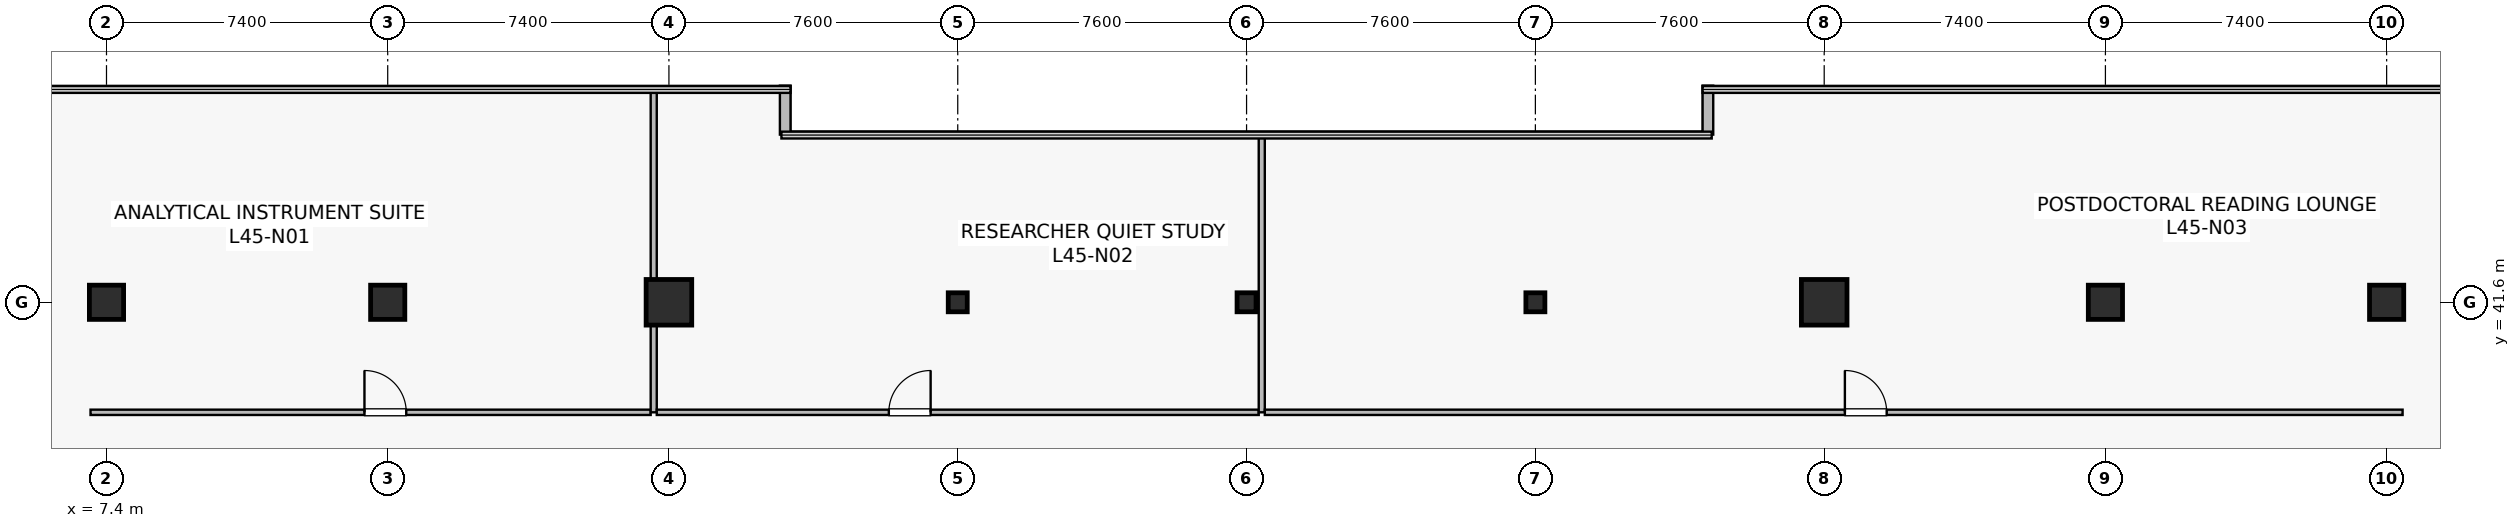
"""IFC4 building model, lengths in metres.
Left out: names, types, materials, properties, quantities, classifications, styles, units other than length and angle.
Written with IfcOpenShell. Run it as: python <this file> out.ifc"""

import sys

from ifc_helpers import new_model, si_unit, direction, frame, frame_2d, origin, origin_2d, place, context, subcontext, project, spatial, rectangle, hollow_rectangle, extrude, source, transform, mapped, element, fill, save


model = new_model("IFC4")
c1 = context("Model", 3, precision=1e-05, world=origin(), true_north=direction((0.0, 1.0)))
c2 = subcontext(c1, "Body", "Model", "MODEL_VIEW")
j1 = project(units=[si_unit("LENGTHUNIT", "METRE"), si_unit("PLANEANGLEUNIT", "RADIAN")], contexts=[c1])
p1 = place(None, origin())
s1 = spatial("IfcSite", under=j1, at=p1, CompositionType="ELEMENT")
p2 = place(p1, origin())
s2 = spatial("IfcBuilding", under=s1, at=p2, CompositionType="ELEMENT")
p3 = place(p2, frame((0.0, 0.0, 187.1)))
s3 = spatial("IfcBuildingStorey", under=s2, at=p3, CompositionType="ELEMENT", Elevation=187.1)
m1 = source(origin(), c2, "Body", "SweptSolid", [
    extrude(rectangle(XDim=0.9, YDim=0.9, at=origin_2d()), origin(), (0.0, 0.0, 1.0), 4.1),
])
p4 = place(p3, frame((14.8, 41.6, 0.0), z_axis=(0.0, 0.0, 1.0), x_axis=(1.0, 0.0, 0.0)))
e1 = element("IfcColumn", 1, at=p4, inside=s3, PredefinedType="COLUMN", context=c2, shape_type="MappedRepresentation", body=[
    mapped(m1, transform((0.0, 0.0, 0.0), scale=1.0)),
])
m2 = source(origin(), c2, "Body", "SweptSolid", [
    extrude(rectangle(XDim=1.2, YDim=1.2, at=origin_2d()), origin(), (0.0, 0.0, 1.0), 4.1),
])
for number, where, z_axis, x_axis in (
    (2, (22.2, 41.6, 0.0), (0.0, 0.0, 1.0), (1.0, 0.0, 0.0)),
    (3, (52.6, 41.6, 0.0), (0.0, 0.0, 1.0), (1.0, 0.0, 0.0)),
):
    element("IfcColumn", number, at=place(p3, frame(where, z_axis=z_axis, x_axis=x_axis)), inside=s3, PredefinedType="COLUMN", context=c2, shape_type="MappedRepresentation", body=[
        mapped(m2, transform((0.0, 0.0, 0.0), scale=1.0)),
    ])
for number, where, z_axis, x_axis in (
    (4, (60.0, 41.6, 0.0), (0.0, 0.0, 1.0), (1.0, 0.0, 0.0)),
    (5, (7.4, 41.6, 0.0), (0.0, 0.0, 1.0), (1.0, 0.0, 0.0)),
    (6, (67.4, 41.6, 0.0), (0.0, 0.0, 1.0), (1.0, 0.0, 0.0)),
):
    element("IfcColumn", number, at=place(p3, frame(where, z_axis=z_axis, x_axis=x_axis)), inside=s3, PredefinedType="COLUMN", context=c2, shape_type="MappedRepresentation", body=[
        mapped(m1, transform((0.0, 0.0, 0.0), scale=1.0)),
    ])
m3 = source(origin(), c2, "Body", "SweptSolid", [
    extrude(hollow_rectangle(XDim=0.5, YDim=0.5, WallThickness=0.022, at=origin_2d()), origin(), (0.0, 0.0, 1.0), 4.1),
])
for number, where, z_axis, x_axis in (
    (7, (29.8, 41.6, 0.0), (0.0, 0.0, 1.0), (1.0, 0.0, 0.0)),
    (8, (37.4, 41.6, 0.0), (0.0, 0.0, 1.0), (1.0, 0.0, 0.0)),
    (9, (45.0, 41.6, 0.0), (0.0, 0.0, 1.0), (1.0, 0.0, 0.0)),
):
    element("IfcColumn", number, at=place(p3, frame(where, z_axis=z_axis, x_axis=x_axis)), inside=s3, PredefinedType="COLUMN", context=c2, shape_type="MappedRepresentation", body=[
        mapped(m3, transform((0.0, 0.0, 0.0), scale=1.0)),
    ])
for number, where, z_axis, x_axis in (
    (10, (49.54, 47.3, 0.0), (0.0, 0.0, 1.0), (0.0, -1.0, 0.0)),
    (11, (25.26, 46.012, 0.0), (0.0, 0.0, 1.0), (0.0, 1.0, 0.0)),
):
    element("IfcWall", number, at=place(p3, frame(where, z_axis=z_axis, x_axis=x_axis)), inside=s3, PredefinedType="STANDARD", context=c2, shape_type="SweptSolid", body=[
        extrude(rectangle(XDim=1.288, YDim=0.28, at=frame_2d((0.644, 0.0))), origin(), (0.0, 0.0, 1.0), 3.79),
    ])
p5 = place(p3, frame((6.98, 38.705, 0.0), z_axis=(0.0, 0.0, 1.0), x_axis=(1.0, 0.0, 0.0)))
e12 = element("IfcWall", 12, at=p5, inside=s3, PredefinedType="PARTITIONING", context=c2, shape_type="SweptSolid", body=[
    extrude(rectangle(XDim=14.74, YDim=0.14, at=frame_2d((7.37, 0.0))), origin(), (0.0, 0.0, 1.0), 3.187),
])
p6 = place(p5, frame((7.208, 0.0, 0.0)))
e13 = element("IfcOpeningElement", 13, at=p6, cuts=e12, PredefinedType="OPENING", context=c2, shape_type="SweptSolid", body=[
    extrude(rectangle(XDim=1.1, YDim=2.18, at=frame_2d((0.55, 1.09))), frame((0.0, 0.08, 0.0), z_axis=(0.0, -1.0, 0.0), x_axis=(1.0, 0.0, 0.0)), (0.0, 0.0, 1.0), 0.16),
])
p7 = place(p3, frame((21.8, 38.705, 0.0), z_axis=(0.0, 0.0, 1.0), x_axis=(0.0, 1.0, 0.0)))
e14 = element("IfcWall", 14, at=p7, inside=s3, PredefinedType="PARTITIONING", context=c2, shape_type="SweptSolid", body=[
    extrude(rectangle(XDim=8.485, YDim=0.16, at=frame_2d((4.242, 0.0))), origin(), (0.0, 0.0, 1.0), 3.075),
])
p8 = place(p3, frame((21.88, 38.705, 0.0), z_axis=(0.0, 0.0, 1.0), x_axis=(1.0, 0.0, 0.0)))
e15 = element("IfcWall", 15, at=p8, inside=s3, PredefinedType="PARTITIONING", context=c2, shape_type="SweptSolid", body=[
    extrude(rectangle(XDim=15.84, YDim=0.14, at=frame_2d((7.92, 0.0))), origin(), (0.0, 0.0, 1.0), 3.187),
])
p9 = place(p8, frame((6.106, 0.0, 0.0)))
e16 = element("IfcOpeningElement", 16, at=p9, cuts=e15, PredefinedType="OPENING", context=c2, shape_type="SweptSolid", body=[
    extrude(rectangle(XDim=1.1, YDim=2.18, at=frame_2d((0.55, 1.09))), frame((0.0, 0.08, 0.0), z_axis=(0.0, -1.0, 0.0), x_axis=(1.0, 0.0, 0.0)), (0.0, 0.0, 1.0), 0.16),
])
p10 = place(p3, frame((37.8, 38.705, 0.0), z_axis=(0.0, 0.0, 1.0), x_axis=(0.0, 1.0, 0.0)))
e17 = element("IfcWall", 17, at=p10, inside=s3, PredefinedType="PARTITIONING", context=c2, shape_type="SweptSolid", body=[
    extrude(rectangle(XDim=7.285, YDim=0.16, at=frame_2d((3.643, 0.0))), origin(), (0.0, 0.0, 1.0), 3.075),
])
p11 = place(p3, frame((37.88, 38.705, 0.0), z_axis=(0.0, 0.0, 1.0), x_axis=(1.0, 0.0, 0.0)))
e18 = element("IfcWall", 18, at=p11, inside=s3, PredefinedType="PARTITIONING", context=c2, shape_type="SweptSolid", body=[
    extrude(rectangle(XDim=29.94, YDim=0.14, at=frame_2d((14.97, 0.0))), origin(), (0.0, 0.0, 1.0), 3.187),
])
p12 = place(p11, frame((15.264, 0.0, 0.0)))
e19 = element("IfcOpeningElement", 19, at=p12, cuts=e18, PredefinedType="OPENING", context=c2, shape_type="SweptSolid", body=[
    extrude(rectangle(XDim=1.1, YDim=2.18, at=frame_2d((0.55, 1.09))), frame((0.0, 0.08, 0.0), z_axis=(0.0, -1.0, 0.0), x_axis=(1.0, 0.0, 0.0)), (0.0, 0.0, 1.0), 0.16),
])
m4 = source(origin(), c2, "Body", "SweptSolid", [
    extrude(rectangle(XDim=1.1, YDim=2.18, at=frame_2d((0.55, 1.09))), frame((0.0, 0.025, 0.0), z_axis=(0.0, -1.0, 0.0), x_axis=(1.0, 0.0, 0.0)), (0.0, 0.0, 1.0), 0.05),
])
p13 = place(p6, origin())
e20 = element("IfcDoor", 20, at=p13, inside=s3, OperationType="SINGLE_SWING_LEFT", PredefinedType="DOOR", context=c2, shape_type="MappedRepresentation", body=[
    mapped(m4, transform((0.0, 0.0, 0.0), scale=1.0)),
])
fill(e13, e20)
p14 = place(p9, origin())
e21 = element("IfcDoor", 21, at=p14, inside=s3, OperationType="SINGLE_SWING_RIGHT", PredefinedType="DOOR", context=c2, shape_type="MappedRepresentation", body=[
    mapped(m4, transform((0.0, 0.0, 0.0), scale=1.0)),
])
fill(e16, e21)
p15 = place(p12, origin())
e22 = element("IfcDoor", 22, at=p15, inside=s3, OperationType="SINGLE_SWING_LEFT", PredefinedType="DOOR", context=c2, shape_type="MappedRepresentation", body=[
    mapped(m4, transform((0.0, 0.0, 0.0), scale=1.0)),
])
fill(e19, e22)
save(model, sys.argv[1])
